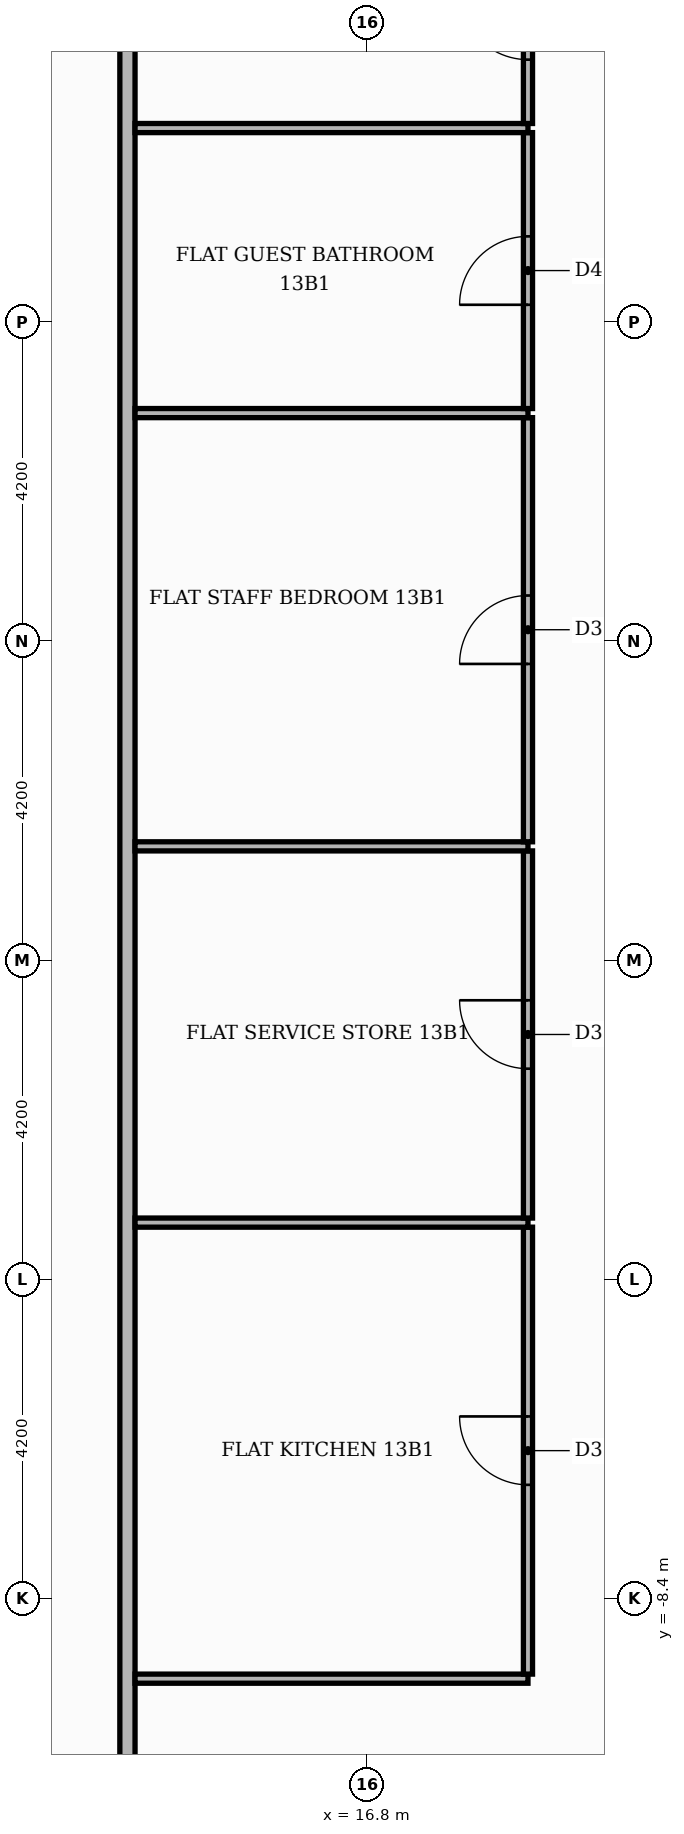
"""IFC4 building model, lengths in metres.
Left out: names, types, materials, properties, quantities, classifications, styles, units other than length and angle.
Written with IfcOpenShell. Run it as: python <this file> out.ifc"""

import sys

from ifc_helpers import new_model, si_unit, direction, frame, frame_2d, origin, place, context, subcontext, project, spatial, rectangle, extrude, element, fill, save


model = new_model("IFC4")
c1 = context("Model", 3, precision=1e-05, world=origin(), true_north=direction((0.0, 1.0)))
c2 = subcontext(c1, "Body", "Model", "MODEL_VIEW")
j1 = project(units=[si_unit("LENGTHUNIT", "METRE"), si_unit("PLANEANGLEUNIT", "RADIAN")], contexts=[c1])
p1 = place(None, origin())
s1 = spatial("IfcSite", under=j1, at=p1, CompositionType="ELEMENT")
p2 = place(p1, origin())
s2 = spatial("IfcBuilding", under=s1, at=p2, CompositionType="ELEMENT")
p3 = place(p2, frame((0.0, 0.0, 58.2)))
s3 = spatial("IfcBuildingStorey", under=s2, at=p3, CompositionType="ELEMENT", Elevation=58.2)
p4 = place(p3, frame((13.65, -13.55, 0.0), z_axis=(0.0, 0.0, 1.0), x_axis=(0.0, 1.0, 0.0)))
e1 = element("IfcWall", 1, at=p4, inside=s3, PredefinedType="PARTITIONING", context=c2, shape_type="SweptSolid", body=[
    extrude(rectangle(XDim=27.1, YDim=0.2, at=frame_2d((13.55, 0.0))), origin(), (0.0, 0.0, 1.0), 3.48),
])
p5 = place(p4, frame((1.45, 0.0, 0.0)))
e2 = element("IfcOpeningElement", 2, at=p5, cuts=e1, PredefinedType="OPENING", context=c2, shape_type="SweptSolid", body=[
    extrude(rectangle(XDim=1.1, YDim=2.4, at=frame_2d((0.55, 1.2))), frame((0.0, 0.11, 0.0), z_axis=(0.0, -1.0, 0.0), x_axis=(1.0, 0.0, 0.0)), (0.0, 0.0, 1.0), 0.22),
])
p6 = place(p3, frame((13.75, -9.45, 0.0), z_axis=(0.0, 0.0, 1.0), x_axis=(1.0, 0.0, 0.0)))
e3 = element("IfcWall", 3, at=p6, inside=s3, PredefinedType="PARTITIONING", context=c2, shape_type="SweptSolid", body=[
    extrude(rectangle(XDim=5.17, YDim=0.12, at=frame_2d((2.585, 0.0))), origin(), (0.0, 0.0, 1.0), 3.48),
])
p7 = place(p3, frame((18.92, -9.39, 0.0), z_axis=(0.0, 0.0, 1.0), x_axis=(0.0, 1.0, 0.0)))
e4 = element("IfcWall", 4, at=p7, inside=s3, PredefinedType="PARTITIONING", context=c2, shape_type="SweptSolid", body=[
    extrude(rectangle(XDim=5.88, YDim=0.12, at=frame_2d((2.94, 0.0))), origin(), (0.0, 0.0, 1.0), 3.48),
])
p8 = place(p7, frame((2.49, 0.0, 0.0)))
e5 = element("IfcOpeningElement", 5, at=p8, cuts=e4, PredefinedType="OPENING", context=c2, shape_type="SweptSolid", body=[
    extrude(rectangle(XDim=0.9, YDim=2.1, at=frame_2d((0.45, 1.05))), frame((0.0, 0.07, 0.0), z_axis=(0.0, -1.0, 0.0), x_axis=(1.0, 0.0, 0.0)), (0.0, 0.0, 1.0), 0.14),
])
p9 = place(p3, frame((13.75, -3.45, 0.0), z_axis=(0.0, 0.0, 1.0), x_axis=(1.0, 0.0, 0.0)))
e6 = element("IfcWall", 6, at=p9, inside=s3, PredefinedType="PARTITIONING", context=c2, shape_type="SweptSolid", body=[
    extrude(rectangle(XDim=5.17, YDim=0.12, at=frame_2d((2.585, 0.0))), origin(), (0.0, 0.0, 1.0), 3.48),
])
p10 = place(p3, frame((18.92, -3.39, 0.0), z_axis=(0.0, 0.0, 1.0), x_axis=(0.0, 1.0, 0.0)))
e7 = element("IfcWall", 7, at=p10, inside=s3, PredefinedType="PARTITIONING", context=c2, shape_type="SweptSolid", body=[
    extrude(rectangle(XDim=4.83, YDim=0.12, at=frame_2d((2.415, 0.0))), origin(), (0.0, 0.0, 1.0), 3.48),
])
p11 = place(p10, frame((1.965, 0.0, 0.0)))
e8 = element("IfcOpeningElement", 8, at=p11, cuts=e7, PredefinedType="OPENING", context=c2, shape_type="SweptSolid", body=[
    extrude(rectangle(XDim=0.9, YDim=2.1, at=frame_2d((0.45, 1.05))), frame((0.0, 0.07, 0.0), z_axis=(0.0, -1.0, 0.0), x_axis=(1.0, 0.0, 0.0)), (0.0, 0.0, 1.0), 0.14),
])
p12 = place(p3, frame((13.75, 1.5, 0.0), z_axis=(0.0, 0.0, 1.0), x_axis=(1.0, 0.0, 0.0)))
e9 = element("IfcWall", 9, at=p12, inside=s3, PredefinedType="PARTITIONING", context=c2, shape_type="SweptSolid", body=[
    extrude(rectangle(XDim=5.17, YDim=0.12, at=frame_2d((2.585, 0.0))), origin(), (0.0, 0.0, 1.0), 3.48),
])
p13 = place(p3, frame((18.92, 1.56, 0.0), z_axis=(0.0, 0.0, 1.0), x_axis=(0.0, 1.0, 0.0)))
e10 = element("IfcWall", 10, at=p13, inside=s3, PredefinedType="PARTITIONING", context=c2, shape_type="SweptSolid", body=[
    extrude(rectangle(XDim=5.58, YDim=0.12, at=frame_2d((2.79, 0.0))), origin(), (0.0, 0.0, 1.0), 3.48),
])
p14 = place(p13, frame((2.34, 0.0, 0.0)))
e11 = element("IfcOpeningElement", 11, at=p14, cuts=e10, PredefinedType="OPENING", context=c2, shape_type="SweptSolid", body=[
    extrude(rectangle(XDim=0.9, YDim=2.1, at=frame_2d((0.45, 1.05))), frame((0.0, 0.07, 0.0), z_axis=(0.0, -1.0, 0.0), x_axis=(1.0, 0.0, 0.0)), (0.0, 0.0, 1.0), 0.14),
])
p15 = place(p3, frame((13.75, 7.2, 0.0), z_axis=(0.0, 0.0, 1.0), x_axis=(1.0, 0.0, 0.0)))
e12 = element("IfcWall", 12, at=p15, inside=s3, PredefinedType="PARTITIONING", context=c2, shape_type="SweptSolid", body=[
    extrude(rectangle(XDim=5.17, YDim=0.12, at=frame_2d((2.585, 0.0))), origin(), (0.0, 0.0, 1.0), 3.48),
])
p16 = place(p3, frame((18.92, 7.26, 0.0), z_axis=(0.0, 0.0, 1.0), x_axis=(0.0, 1.0, 0.0)))
e13 = element("IfcWall", 13, at=p16, inside=s3, PredefinedType="PARTITIONING", context=c2, shape_type="SweptSolid", body=[
    extrude(rectangle(XDim=3.63, YDim=0.12, at=frame_2d((1.815, 0.0))), origin(), (0.0, 0.0, 1.0), 3.48),
])
p17 = place(p16, frame((1.365, 0.0, 0.0)))
e14 = element("IfcOpeningElement", 14, at=p17, cuts=e13, PredefinedType="OPENING", context=c2, shape_type="SweptSolid", body=[
    extrude(rectangle(XDim=0.9, YDim=2.1, at=frame_2d((0.45, 1.05))), frame((0.0, 0.07, 0.0), z_axis=(0.0, -1.0, 0.0), x_axis=(1.0, 0.0, 0.0)), (0.0, 0.0, 1.0), 0.14),
])
p18 = place(p3, frame((13.75, 10.95, 0.0), z_axis=(0.0, 0.0, 1.0), x_axis=(1.0, 0.0, 0.0)))
e15 = element("IfcWall", 15, at=p18, inside=s3, PredefinedType="PARTITIONING", context=c2, shape_type="SweptSolid", body=[
    extrude(rectangle(XDim=5.17, YDim=0.12, at=frame_2d((2.585, 0.0))), origin(), (0.0, 0.0, 1.0), 3.48),
])
p19 = place(p3, frame((18.92, 11.01, 0.0), z_axis=(0.0, 0.0, 1.0), x_axis=(0.0, 1.0, 0.0)))
e16 = element("IfcWall", 16, at=p19, inside=s3, PredefinedType="PARTITIONING", context=c2, shape_type="SweptSolid", body=[
    extrude(rectangle(XDim=2.54, YDim=0.12, at=frame_2d((1.27, 0.0))), origin(), (0.0, 0.0, 1.0), 3.48),
])
p20 = place(p19, frame((0.84, 0.0, 0.0)))
e17 = element("IfcOpeningElement", 17, at=p20, cuts=e16, PredefinedType="OPENING", context=c2, shape_type="SweptSolid", body=[
    extrude(rectangle(XDim=0.9, YDim=2.1, at=frame_2d((0.45, 1.05))), frame((0.0, 0.07, 0.0), z_axis=(0.0, -1.0, 0.0), x_axis=(1.0, 0.0, 0.0)), (0.0, 0.0, 1.0), 0.14),
])
p21 = place(p8, origin())
e18 = element("IfcDoor", 18, at=p21, inside=s3, OperationType="SINGLE_SWING_RIGHT", PredefinedType="DOOR", context=c2, shape_type="SweptSolid", body=[
    extrude(rectangle(XDim=0.9, YDim=2.1, at=frame_2d((0.45, 1.05))), frame((0.0, 0.025, 0.0), z_axis=(0.0, -1.0, 0.0), x_axis=(1.0, 0.0, 0.0)), (0.0, 0.0, 1.0), 0.05),
])
fill(e5, e18)
p22 = place(p11, origin())
e19 = element("IfcDoor", 19, at=p22, inside=s3, OperationType="SINGLE_SWING_RIGHT", PredefinedType="DOOR", context=c2, shape_type="SweptSolid", body=[
    extrude(rectangle(XDim=0.9, YDim=2.1, at=frame_2d((0.45, 1.05))), frame((0.0, 0.025, 0.0), z_axis=(0.0, -1.0, 0.0), x_axis=(1.0, 0.0, 0.0)), (0.0, 0.0, 1.0), 0.05),
])
fill(e8, e19)
p23 = place(p14, origin())
e20 = element("IfcDoor", 20, at=p23, inside=s3, OperationType="SINGLE_SWING_LEFT", PredefinedType="DOOR", context=c2, shape_type="SweptSolid", body=[
    extrude(rectangle(XDim=0.9, YDim=2.1, at=frame_2d((0.45, 1.05))), frame((0.0, 0.025, 0.0), z_axis=(0.0, -1.0, 0.0), x_axis=(1.0, 0.0, 0.0)), (0.0, 0.0, 1.0), 0.05),
])
fill(e11, e20)
p24 = place(p17, origin())
e21 = element("IfcDoor", 21, at=p24, inside=s3, OperationType="SINGLE_SWING_LEFT", PredefinedType="DOOR", context=c2, shape_type="SweptSolid", body=[
    extrude(rectangle(XDim=0.9, YDim=2.1, at=frame_2d((0.45, 1.05))), frame((0.0, 0.025, 0.0), z_axis=(0.0, -1.0, 0.0), x_axis=(1.0, 0.0, 0.0)), (0.0, 0.0, 1.0), 0.05),
])
fill(e14, e21)
p25 = place(p20, origin())
e22 = element("IfcDoor", 22, at=p25, inside=s3, OperationType="SINGLE_SWING_RIGHT", PredefinedType="DOOR", context=c2, shape_type="SweptSolid", body=[
    extrude(rectangle(XDim=0.9, YDim=2.1, at=frame_2d((0.45, 1.05))), frame((0.0, 0.025, 0.0), z_axis=(0.0, -1.0, 0.0), x_axis=(1.0, 0.0, 0.0)), (0.0, 0.0, 1.0), 0.05),
])
fill(e17, e22)
save(model, sys.argv[1])
